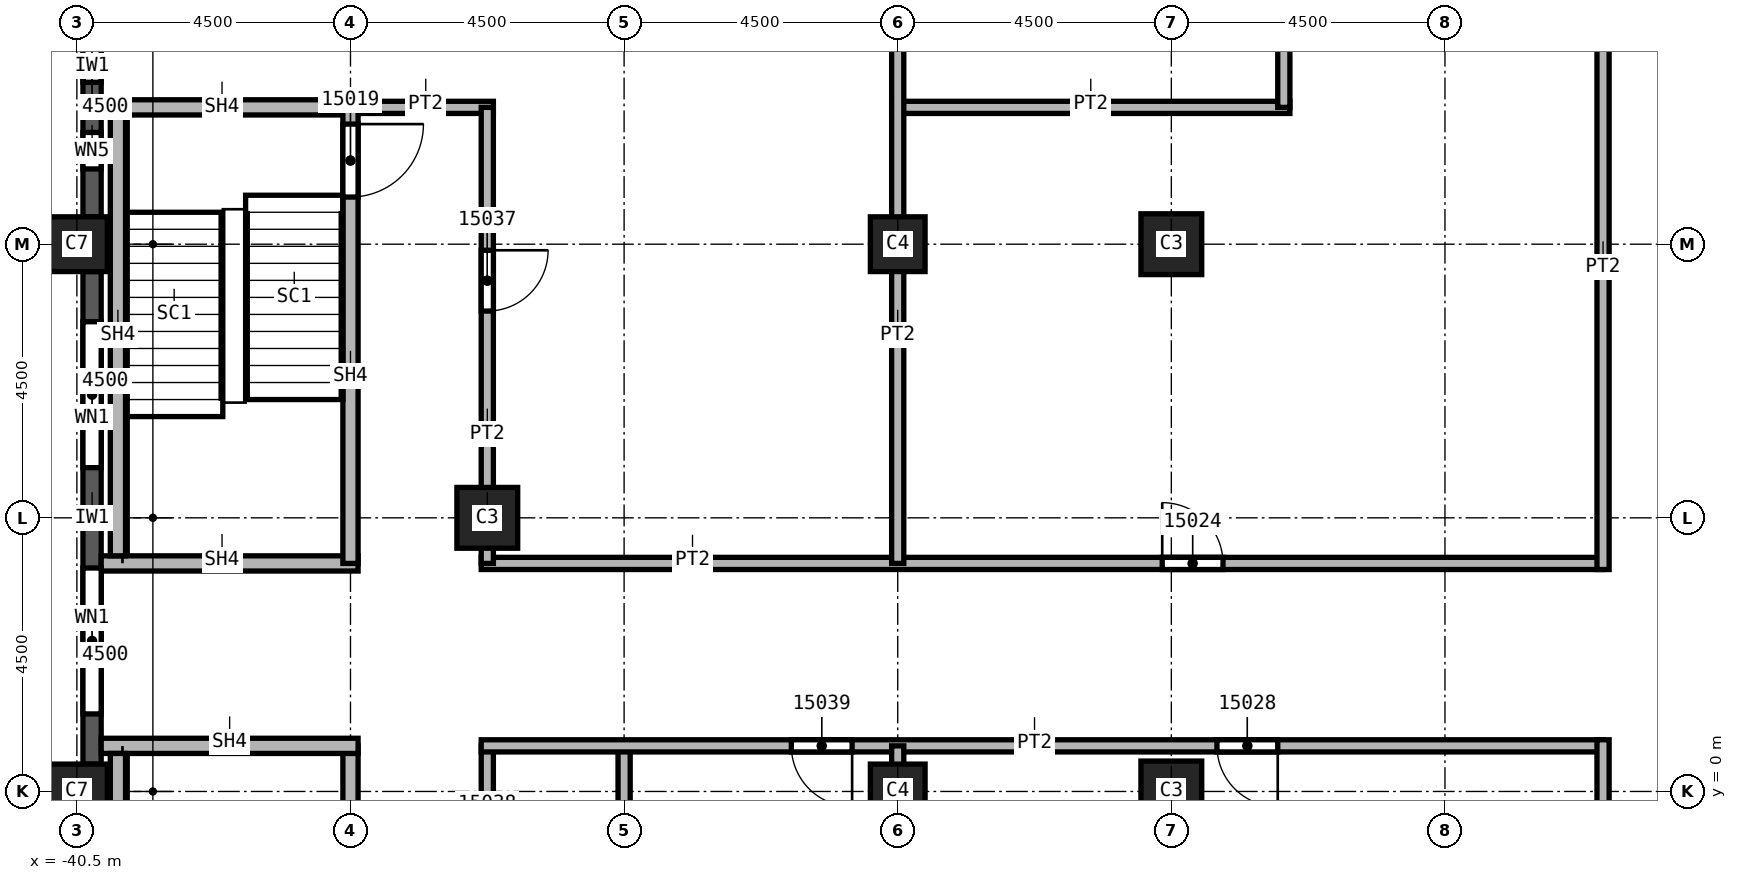
"""IFC4 building model, lengths in metres.
Left out: names, types, materials, properties, quantities, classifications, styles, units other than length and angle.
Written with IfcOpenShell. Run it as: python <this file> out.ifc"""

import sys

from ifc_helpers import new_model, si_unit, direction, frame, frame_2d, origin, origin_2d, place, context, subcontext, project, spatial, rectangle, extrude, element, fill, save


model = new_model("IFC4")
c1 = context("Model", 3, precision=1e-05, world=origin(), true_north=direction((0.0, 1.0)))
c2 = subcontext(c1, "Body", "Model", "MODEL_VIEW")
j1 = project(units=[si_unit("LENGTHUNIT", "METRE"), si_unit("PLANEANGLEUNIT", "RADIAN")], contexts=[c1])
p1 = place(None, origin())
s1 = spatial("IfcSite", under=j1, at=p1, CompositionType="ELEMENT")
p2 = place(p1, origin())
s2 = spatial("IfcBuilding", under=s1, at=p2, CompositionType="ELEMENT")
p3 = place(p2, frame((0.0, 0.0, 228.0)))
s3 = spatial("IfcBuildingStorey", under=s2, at=p3, CompositionType="ELEMENT", Elevation=228.0)
for number, where, z_axis, x_axis in (
    (1, (-40.5, 0.0, 0.0), (0.0, 0.0, 1.0), (0.0, 1.0, 0.0)),
    (2, (-40.5, 9.0, 0.0), (0.0, 0.0, 1.0), (0.0, 1.0, 0.0)),
):
    element("IfcColumn", number, at=place(p3, frame(where, z_axis=z_axis, x_axis=x_axis)), inside=s3, PredefinedType="COLUMN", context=c2, shape_type="SweptSolid", body=[
        extrude(rectangle(XDim=0.9, YDim=1.0, at=origin_2d()), origin(), (0.0, 0.0, 1.0), 3.72),
    ])
for number, where, z_axis, x_axis in (
    (3, (-33.75, 4.5, 0.0), (0.0, 0.0, 1.0), (1.0, 0.0, 0.0)),
    (4, (-22.5, 0.0, 0.0), (0.0, 0.0, 1.0), (1.0, 0.0, 0.0)),
    (5, (-22.5, 9.0, 0.0), (0.0, 0.0, 1.0), (1.0, 0.0, 0.0)),
):
    element("IfcColumn", number, at=place(p3, frame(where, z_axis=z_axis, x_axis=x_axis)), inside=s3, PredefinedType="COLUMN", context=c2, shape_type="SweptSolid", body=[
        extrude(rectangle(XDim=1.0, YDim=1.0, at=origin_2d()), origin(), (0.0, 0.0, 1.0), 3.72),
    ])
for number, where, z_axis, x_axis in (
    (6, (-27.0, 0.0, 0.0), (0.0, 0.0, 1.0), (1.0, 0.0, 0.0)),
    (7, (-27.0, 9.0, 0.0), (0.0, 0.0, 1.0), (1.0, 0.0, 0.0)),
):
    element("IfcColumn", number, at=place(p3, frame(where, z_axis=z_axis, x_axis=x_axis)), inside=s3, PredefinedType="COLUMN", context=c2, shape_type="SweptSolid", body=[
        extrude(rectangle(XDim=0.9, YDim=0.9, at=origin_2d()), origin(), (0.0, 0.0, 1.0), 3.72),
    ])
p4 = place(p3, frame((-40.25, 13.05, 0.0), z_axis=(0.0, 0.0, 1.0), x_axis=(0.0, -1.0, 0.0)))
e8 = element("IfcWall", 8, at=p4, inside=s3, PredefinedType="SOLIDWALL", context=c2, shape_type="SweptSolid", body=[
    extrude(rectangle(XDim=3.6, YDim=0.3, at=frame_2d((1.8, 0.0))), origin(), (0.0, 0.0, 1.0), 3.12),
])
p5 = place(p4, frame((0.788, 0.0, 0.8)))
e9 = element("IfcOpeningElement", 9, at=p5, cuts=e8, PredefinedType="OPENING", context=c2, shape_type="SweptSolid", body=[
    extrude(rectangle(XDim=0.6, YDim=1.95, at=frame_2d((0.3, 0.975))), frame((0.0, 0.15, 0.0), z_axis=(0.0, -1.0, 0.0), x_axis=(1.0, 0.0, 0.0)), (0.0, 0.0, 1.0), 0.3),
])
p6 = place(p4, frame((2.212, 0.0, 0.8)))
e10 = element("IfcOpeningElement", 10, at=p6, cuts=e8, PredefinedType="OPENING", context=c2, shape_type="SweptSolid", body=[
    extrude(rectangle(XDim=0.6, YDim=1.95, at=frame_2d((0.3, 0.975))), frame((0.0, 0.15, 0.0), z_axis=(0.0, -1.0, 0.0), x_axis=(1.0, 0.0, 0.0)), (0.0, 0.0, 1.0), 0.3),
])
p7 = place(p3, frame((-40.25, 8.55, 0.0), z_axis=(0.0, 0.0, 1.0), x_axis=(0.0, -1.0, 0.0)))
e11 = element("IfcWall", 11, at=p7, inside=s3, PredefinedType="SOLIDWALL", context=c2, shape_type="SweptSolid", body=[
    extrude(rectangle(XDim=8.1, YDim=0.3, at=frame_2d((4.05, 0.0))), origin(), (0.0, 0.0, 1.0), 3.12),
])
p8 = place(p7, frame((0.825, 0.0, 0.8)))
e12 = element("IfcOpeningElement", 12, at=p8, cuts=e11, PredefinedType="OPENING", context=c2, shape_type="SweptSolid", body=[
    extrude(rectangle(XDim=2.4, YDim=1.95, at=frame_2d((1.2, 0.975))), frame((0.0, 0.15, 0.0), z_axis=(0.0, -1.0, 0.0), x_axis=(1.0, 0.0, 0.0)), (0.0, 0.0, 1.0), 0.3),
])
p9 = place(p7, frame((4.875, 0.0, 0.8)))
e13 = element("IfcOpeningElement", 13, at=p9, cuts=e11, PredefinedType="OPENING", context=c2, shape_type="SweptSolid", body=[
    extrude(rectangle(XDim=2.4, YDim=1.95, at=frame_2d((1.2, 0.975))), frame((0.0, 0.15, 0.0), z_axis=(0.0, -1.0, 0.0), x_axis=(1.0, 0.0, 0.0)), (0.0, 0.0, 1.0), 0.3),
])
p10 = place(p3, frame((-36.0, 11.25, 0.0), z_axis=(0.0, 0.0, 1.0), x_axis=(1.0, 0.0, 0.0)))
e14 = element("IfcWall", 14, at=p10, inside=s3, PredefinedType="PARTITIONING", context=c2, shape_type="SweptSolid", body=[
    extrude(rectangle(XDim=2.35, YDim=0.2, at=frame_2d((1.175, 0.0))), origin(), (0.0, 0.0, 1.0), 3.72),
])
p11 = place(p3, frame((-33.85, 3.75, 0.0), z_axis=(0.0, 0.0, 1.0), x_axis=(1.0, 0.0, 0.0)))
e15 = element("IfcWall", 15, at=p11, inside=s3, PredefinedType="PARTITIONING", context=c2, shape_type="SweptSolid", body=[
    extrude(rectangle(XDim=18.45, YDim=0.2, at=frame_2d((9.225, 0.0))), origin(), (0.0, 0.0, 1.0), 3.72),
])
p12 = place(p11, frame((11.2, 0.0, 0.0)))
e16 = element("IfcOpeningElement", 16, at=p12, cuts=e15, PredefinedType="OPENING", context=c2, shape_type="SweptSolid", body=[
    extrude(rectangle(XDim=1.0, YDim=2.1, at=frame_2d((0.5, 1.05))), frame((0.0, 0.1, 0.0), z_axis=(0.0, -1.0, 0.0), x_axis=(1.0, 0.0, 0.0)), (0.0, 0.0, 1.0), 0.2),
])
p13 = place(p3, frame((-33.75, 0.75, 0.0), z_axis=(0.0, 0.0, 1.0), x_axis=(0.0, -1.0, 0.0)))
e17 = element("IfcWall", 17, at=p13, inside=s3, PredefinedType="PARTITIONING", context=c2, shape_type="SweptSolid", body=[
    extrude(rectangle(XDim=7.6, YDim=0.2, at=frame_2d((3.8, 0.0))), origin(), (0.0, 0.0, 1.0), 3.72),
])
p14 = place(p13, frame((1.45, 0.0, 0.0)))
e18 = element("IfcOpeningElement", 18, at=p14, cuts=e17, PredefinedType="OPENING", context=c2, shape_type="SweptSolid", body=[
    extrude(rectangle(XDim=1.0, YDim=2.1, at=frame_2d((0.5, 1.05))), frame((0.0, 0.1, 0.0), z_axis=(0.0, -1.0, 0.0), x_axis=(1.0, 0.0, 0.0)), (0.0, 0.0, 1.0), 0.2),
])
p15 = place(p3, frame((-33.75, 11.25, 0.0), z_axis=(0.0, 0.0, 1.0), x_axis=(0.0, -1.0, 0.0)))
e19 = element("IfcWall", 19, at=p15, inside=s3, PredefinedType="PARTITIONING", context=c2, shape_type="SweptSolid", body=[
    extrude(rectangle(XDim=7.5, YDim=0.2, at=frame_2d((3.75, 0.0))), origin(), (0.0, 0.0, 1.0), 3.72),
])
p16 = place(p15, frame((2.35, 0.0, 0.0)))
e20 = element("IfcOpeningElement", 20, at=p16, cuts=e19, PredefinedType="OPENING", context=c2, shape_type="SweptSolid", body=[
    extrude(rectangle(XDim=1.0, YDim=2.1, at=frame_2d((0.5, 1.05))), frame((0.0, 0.1, 0.0), z_axis=(0.0, -1.0, 0.0), x_axis=(1.0, 0.0, 0.0)), (0.0, 0.0, 1.0), 0.2),
])
p17 = place(p3, frame((-31.5, 0.75, 0.0), z_axis=(0.0, 0.0, 1.0), x_axis=(0.0, -1.0, 0.0)))
e21 = element("IfcWall", 21, at=p17, inside=s3, PredefinedType="PARTITIONING", context=c2, shape_type="SweptSolid", body=[
    extrude(rectangle(XDim=18.25, YDim=0.2, at=frame_2d((9.125, 0.0))), origin(), (0.0, 0.0, 1.0), 3.72),
])
p18 = place(p3, frame((-15.4, 0.75, 0.0), z_axis=(0.0, 0.0, 1.0), x_axis=(-1.0, 0.0, 0.0)))
e22 = element("IfcWall", 22, at=p18, inside=s3, PredefinedType="PARTITIONING", context=c2, shape_type="SweptSolid", body=[
    extrude(rectangle(XDim=18.45, YDim=0.2, at=frame_2d((9.225, 0.0))), origin(), (0.0, 0.0, 1.0), 3.72),
])
p19 = place(p18, frame((5.35, 0.0, 0.0)))
e23 = element("IfcOpeningElement", 23, at=p19, cuts=e22, PredefinedType="OPENING", context=c2, shape_type="SweptSolid", body=[
    extrude(rectangle(XDim=1.0, YDim=2.1, at=frame_2d((0.5, 1.05))), frame((0.0, 0.1, 0.0), z_axis=(0.0, -1.0, 0.0), x_axis=(1.0, 0.0, 0.0)), (0.0, 0.0, 1.0), 0.2),
])
p20 = place(p18, frame((12.35, 0.0, 0.0)))
e24 = element("IfcOpeningElement", 24, at=p20, cuts=e22, PredefinedType="OPENING", context=c2, shape_type="SweptSolid", body=[
    extrude(rectangle(XDim=1.0, YDim=2.1, at=frame_2d((0.5, 1.05))), frame((0.0, 0.1, 0.0), z_axis=(0.0, -1.0, 0.0), x_axis=(1.0, 0.0, 0.0)), (0.0, 0.0, 1.0), 0.2),
])
p21 = place(p3, frame((-27.1, 11.25, 0.0), z_axis=(0.0, 0.0, 1.0), x_axis=(1.0, 0.0, 0.0)))
e25 = element("IfcWall", 25, at=p21, inside=s3, PredefinedType="PARTITIONING", context=c2, shape_type="SweptSolid", body=[
    extrude(rectangle(XDim=6.55, YDim=0.2, at=frame_2d((3.275, 0.0))), origin(), (0.0, 0.0, 1.0), 3.72),
])
p22 = place(p3, frame((-27.0, -17.5, 0.0), z_axis=(0.0, 0.0, 1.0), x_axis=(0.0, 1.0, 0.0)))
e26 = element("IfcWall", 26, at=p22, inside=s3, PredefinedType="PARTITIONING", context=c2, shape_type="SweptSolid", body=[
    extrude(rectangle(XDim=18.25, YDim=0.2, at=frame_2d((9.125, 0.0))), origin(), (0.0, 0.0, 1.0), 3.72),
])
p23 = place(p3, frame((-27.0, 3.75, 0.0), z_axis=(0.0, 0.0, 1.0), x_axis=(0.0, 1.0, 0.0)))
e27 = element("IfcWall", 27, at=p23, inside=s3, PredefinedType="PARTITIONING", context=c2, shape_type="SweptSolid", body=[
    extrude(rectangle(XDim=13.75, YDim=0.2, at=frame_2d((6.875, 0.0))), origin(), (0.0, 0.0, 1.0), 3.72),
])
p24 = place(p3, frame((-20.65, 11.25, 0.0), z_axis=(0.0, 0.0, 1.0), x_axis=(0.0, 1.0, 0.0)))
e28 = element("IfcWall", 28, at=p24, inside=s3, PredefinedType="PARTITIONING", context=c2, shape_type="SweptSolid", body=[
    extrude(rectangle(XDim=2.25, YDim=0.2, at=frame_2d((1.125, 0.0))), origin(), (0.0, 0.0, 1.0), 3.72),
])
p25 = place(p3, frame((-15.4, -22.4, 0.0), z_axis=(0.0, 0.0, 1.0), x_axis=(0.0, 1.0, 0.0)))
e29 = element("IfcWall", 29, at=p25, inside=s3, PredefinedType="PARTITIONING", context=c2, shape_type="SweptSolid", body=[
    extrude(rectangle(XDim=23.25, YDim=0.2, at=frame_2d((11.625, 0.0))), origin(), (0.0, 0.0, 1.0), 3.72),
])
p26 = place(p25, frame((0.25, 0.0, 0.0)))
e30 = element("IfcOpeningElement", 30, at=p26, cuts=e29, PredefinedType="OPENING", context=c2, shape_type="SweptSolid", body=[
    extrude(rectangle(XDim=1.0, YDim=2.1, at=frame_2d((0.5, 1.05))), frame((0.0, 0.1, 0.0), z_axis=(0.0, -1.0, 0.0), x_axis=(1.0, 0.0, 0.0)), (0.0, 0.0, 1.0), 0.2),
])
p27 = place(p25, frame((7.7, 0.0, 0.0)))
e31 = element("IfcOpeningElement", 31, at=p27, cuts=e29, PredefinedType="OPENING", context=c2, shape_type="SweptSolid", body=[
    extrude(rectangle(XDim=1.0, YDim=2.1, at=frame_2d((0.5, 1.05))), frame((0.0, 0.1, 0.0), z_axis=(0.0, -1.0, 0.0), x_axis=(1.0, 0.0, 0.0)), (0.0, 0.0, 1.0), 0.2),
])
p28 = place(p25, frame((14.75, 0.0, 0.0)))
e32 = element("IfcOpeningElement", 32, at=p28, cuts=e29, PredefinedType="OPENING", context=c2, shape_type="SweptSolid", body=[
    extrude(rectangle(XDim=1.0, YDim=2.1, at=frame_2d((0.5, 1.05))), frame((0.0, 0.1, 0.0), z_axis=(0.0, -1.0, 0.0), x_axis=(1.0, 0.0, 0.0)), (0.0, 0.0, 1.0), 0.2),
])
p29 = place(p3, frame((-15.4, 3.65, 0.0), z_axis=(0.0, 0.0, 1.0), x_axis=(0.0, 1.0, 0.0)))
e33 = element("IfcWall", 33, at=p29, inside=s3, PredefinedType="PARTITIONING", context=c2, shape_type="SweptSolid", body=[
    extrude(rectangle(XDim=9.95, YDim=0.2, at=frame_2d((4.975, 0.0))), origin(), (0.0, 0.0, 1.0), 3.72),
])
p30 = place(p3, frame((-40.1, 3.75, 0.0), z_axis=(0.0, 0.0, 1.0), x_axis=(1.0, 0.0, 0.0)))
e34 = element("IfcWall", 34, at=p30, inside=s3, PredefinedType="SOLIDWALL", context=c2, shape_type="SweptSolid", body=[
    extrude(rectangle(XDim=4.225, YDim=0.25, at=frame_2d((2.113, 0.0))), origin(), (0.0, 0.0, 1.0), 3.72),
])
p31 = place(p3, frame((-40.1, 11.25, 0.0), z_axis=(0.0, 0.0, 1.0), x_axis=(1.0, 0.0, 0.0)))
e35 = element("IfcWall", 35, at=p31, inside=s3, PredefinedType="SOLIDWALL", context=c2, shape_type="SweptSolid", body=[
    extrude(rectangle(XDim=4.1, YDim=0.25, at=frame_2d((2.05, 0.0))), origin(), (0.0, 0.0, 1.0), 3.72),
])
p32 = place(p3, frame((-36.0, 0.75, 0.0), z_axis=(0.0, 0.0, 1.0), x_axis=(0.0, -1.0, 0.0)))
e36 = element("IfcWall", 36, at=p32, inside=s3, PredefinedType="SOLIDWALL", context=c2, shape_type="SweptSolid", body=[
    extrude(rectangle(XDim=7.625, YDim=0.25, at=frame_2d((3.812, 0.0))), origin(), (0.0, 0.0, 1.0), 3.72),
])
p33 = place(p32, frame((5.95, 0.0, 0.0)))
e37 = element("IfcOpeningElement", 37, at=p33, cuts=e36, PredefinedType="OPENING", context=c2, shape_type="SweptSolid", body=[
    extrude(rectangle(XDim=1.2, YDim=2.1, at=frame_2d((0.6, 1.05))), frame((0.0, 0.125, 0.0), z_axis=(0.0, -1.0, 0.0), x_axis=(1.0, 0.0, 0.0)), (0.0, 0.0, 1.0), 0.25),
])
p34 = place(p3, frame((-36.0, 11.375, 0.0), z_axis=(0.0, 0.0, 1.0), x_axis=(0.0, -1.0, 0.0)))
e38 = element("IfcWall", 38, at=p34, inside=s3, PredefinedType="SOLIDWALL", context=c2, shape_type="SweptSolid", body=[
    extrude(rectangle(XDim=7.625, YDim=0.25, at=frame_2d((3.812, 0.0))), origin(), (0.0, 0.0, 1.0), 3.72),
])
p35 = place(p34, frame((0.4, 0.0, 0.0)))
e39 = element("IfcOpeningElement", 39, at=p35, cuts=e38, PredefinedType="OPENING", context=c2, shape_type="SweptSolid", body=[
    extrude(rectangle(XDim=1.2, YDim=2.1, at=frame_2d((0.6, 1.05))), frame((0.0, 0.125, 0.0), z_axis=(0.0, -1.0, 0.0), x_axis=(1.0, 0.0, 0.0)), (0.0, 0.0, 1.0), 0.25),
])
p36 = place(p3, frame((-35.875, 0.75, 0.0), z_axis=(0.0, 0.0, 1.0), x_axis=(-1.0, 0.0, 0.0)))
e40 = element("IfcWall", 40, at=p36, inside=s3, PredefinedType="SOLIDWALL", context=c2, shape_type="SweptSolid", body=[
    extrude(rectangle(XDim=4.225, YDim=0.25, at=frame_2d((2.113, 0.0))), origin(), (0.0, 0.0, 1.0), 3.72),
])
for number, where, z_axis, x_axis in (
    (41, (-39.825, 3.875, 0.0), (0.0, 0.0, 1.0), (0.0, 1.0, 0.0)),
    (42, (-39.825, -6.625, 0.0), (0.0, 0.0, 1.0), (0.0, 1.0, 0.0)),
):
    element("IfcWall", number, at=place(p3, frame(where, z_axis=z_axis, x_axis=x_axis)), inside=s3, PredefinedType="SOLIDWALL", context=c2, shape_type="SweptSolid", body=[
        extrude(rectangle(XDim=7.25, YDim=0.25, at=frame_2d((3.625, 0.0))), origin(), (0.0, 0.0, 1.0), 3.72),
    ])
p37 = place(p8, origin())
e43 = element("IfcWindow", 43, at=p37, inside=s3, PartitioningType="SINGLE_PANEL", PredefinedType="WINDOW", context=c2, shape_type="SweptSolid", body=[
    extrude(rectangle(XDim=2.4, YDim=1.95, at=frame_2d((1.2, 0.975))), frame((0.0, 0.03, 0.0), z_axis=(0.0, -1.0, 0.0), x_axis=(1.0, 0.0, 0.0)), (0.0, 0.0, 1.0), 0.06),
])
fill(e12, e43)
p38 = place(p9, origin())
e44 = element("IfcWindow", 44, at=p38, inside=s3, PartitioningType="SINGLE_PANEL", PredefinedType="WINDOW", context=c2, shape_type="SweptSolid", body=[
    extrude(rectangle(XDim=2.4, YDim=1.95, at=frame_2d((1.2, 0.975))), frame((0.0, 0.03, 0.0), z_axis=(0.0, -1.0, 0.0), x_axis=(1.0, 0.0, 0.0)), (0.0, 0.0, 1.0), 0.06),
])
fill(e13, e44)
p39 = place(p35, origin())
e45 = element("IfcDoor", 45, at=p39, inside=s3, OperationType="SINGLE_SWING_RIGHT", PredefinedType="DOOR", context=c2, shape_type="SweptSolid", body=[
    extrude(rectangle(XDim=1.2, YDim=2.1, at=frame_2d((0.6, 1.05))), frame((0.0, 0.025, 0.0), z_axis=(0.0, -1.0, 0.0), x_axis=(1.0, 0.0, 0.0)), (0.0, 0.0, 1.0), 0.05),
])
fill(e39, e45)
p40 = place(p12, origin())
e46 = element("IfcDoor", 46, at=p40, inside=s3, OperationType="SINGLE_SWING_LEFT", PredefinedType="DOOR", context=c2, shape_type="SweptSolid", body=[
    extrude(rectangle(XDim=1.0, YDim=2.1, at=frame_2d((0.5, 1.05))), frame((0.0, 0.025, 0.0), z_axis=(0.0, -1.0, 0.0), x_axis=(1.0, 0.0, 0.0)), (0.0, 0.0, 1.0), 0.05),
])
fill(e16, e46)
p41 = place(p19, origin())
e47 = element("IfcDoor", 47, at=p41, inside=s3, OperationType="SINGLE_SWING_LEFT", PredefinedType="DOOR", context=c2, shape_type="SweptSolid", body=[
    extrude(rectangle(XDim=1.0, YDim=2.1, at=frame_2d((0.5, 1.05))), frame((0.0, 0.025, 0.0), z_axis=(0.0, -1.0, 0.0), x_axis=(1.0, 0.0, 0.0)), (0.0, 0.0, 1.0), 0.05),
])
fill(e23, e47)
p42 = place(p16, origin())
e48 = element("IfcDoor", 48, at=p42, inside=s3, OperationType="SINGLE_SWING_RIGHT", PredefinedType="DOOR", context=c2, shape_type="SweptSolid", body=[
    extrude(rectangle(XDim=1.0, YDim=2.1, at=frame_2d((0.5, 1.05))), frame((0.0, 0.025, 0.0), z_axis=(0.0, -1.0, 0.0), x_axis=(1.0, 0.0, 0.0)), (0.0, 0.0, 1.0), 0.05),
])
fill(e20, e48)
p43 = place(p20, origin())
e49 = element("IfcDoor", 49, at=p43, inside=s3, OperationType="SINGLE_SWING_RIGHT", PredefinedType="DOOR", context=c2, shape_type="SweptSolid", body=[
    extrude(rectangle(XDim=1.0, YDim=2.1, at=frame_2d((0.5, 1.05))), frame((0.0, 0.025, 0.0), z_axis=(0.0, -1.0, 0.0), x_axis=(1.0, 0.0, 0.0)), (0.0, 0.0, 1.0), 0.05),
])
fill(e24, e49)
p44 = place(p5, origin())
e50 = element("IfcWindow", 50, at=p44, inside=s3, PartitioningType="SINGLE_PANEL", PredefinedType="WINDOW", context=c2, shape_type="SweptSolid", body=[
    extrude(rectangle(XDim=0.6, YDim=1.95, at=frame_2d((0.3, 0.975))), frame((0.0, 0.03, 0.0), z_axis=(0.0, -1.0, 0.0), x_axis=(1.0, 0.0, 0.0)), (0.0, 0.0, 1.0), 0.06),
])
fill(e9, e50)
p45 = place(p6, origin())
e51 = element("IfcWindow", 51, at=p45, inside=s3, PartitioningType="SINGLE_PANEL", PredefinedType="WINDOW", context=c2, shape_type="SweptSolid", body=[
    extrude(rectangle(XDim=0.6, YDim=1.95, at=frame_2d((0.3, 0.975))), frame((0.0, 0.03, 0.0), z_axis=(0.0, -1.0, 0.0), x_axis=(1.0, 0.0, 0.0)), (0.0, 0.0, 1.0), 0.06),
])
fill(e10, e51)
save(model, sys.argv[1])
